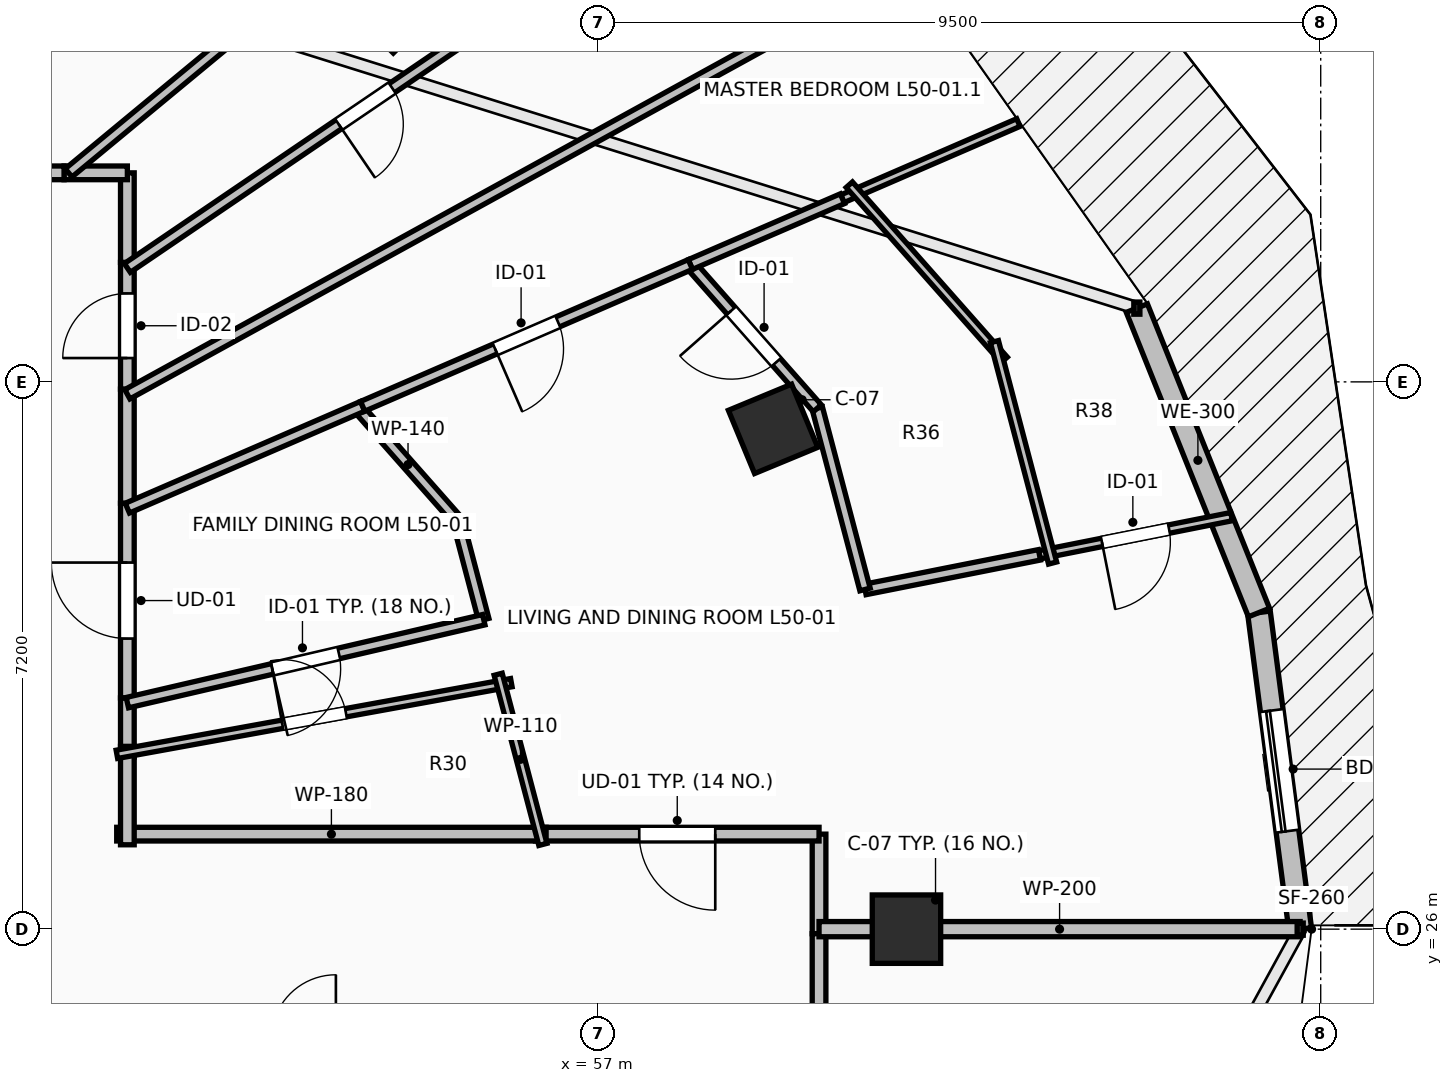
"""IFC4 building model, lengths in metres.
Left out: names, types, materials, properties, quantities, classifications, styles, units other than length and angle.
Written with IfcOpenShell. Run it as: python <this file> out.ifc"""

import sys

from ifc_helpers import new_model, si_unit, direction, frame, frame_2d, origin, origin_2d, place, context, subcontext, project, spatial, rectangle, extrude, element, fill, save


model = new_model("IFC4")
c1 = context("Model", 3, precision=1e-05, world=origin(), true_north=direction((0.0, 1.0)))
c2 = subcontext(c1, "Body", "Model", "MODEL_VIEW")
j1 = project(units=[si_unit("LENGTHUNIT", "METRE"), si_unit("PLANEANGLEUNIT", "RADIAN")], contexts=[c1])
p1 = place(None, origin())
s1 = spatial("IfcSite", under=j1, at=p1, CompositionType="ELEMENT")
p2 = place(p1, origin())
s2 = spatial("IfcBuilding", under=s1, at=p2, CompositionType="ELEMENT")
p3 = place(p2, frame((0.0, 0.0, 186.1)))
s3 = spatial("IfcBuildingStorey", under=s2, at=p3, CompositionType="ELEMENT", Elevation=186.1)
for number, where, z_axis, x_axis in (
    (1, (61.05, 26.0, 0.0), (0.0, 0.0, 1.0), (1.0, 0.0, 0.0)),
    (2, (59.295, 32.582, 0.0), (0.0, 0.0, 1.0), (0.924, 0.383, 0.0)),
    (3, (54.299, 38.162, 0.0), (0.0, 0.0, 1.0), (0.707, 0.707, 0.0)),
):
    element("IfcColumn", number, at=place(p3, frame(where, z_axis=z_axis, x_axis=x_axis)), inside=s3, PredefinedType="COLUMN", context=c2, shape_type="SweptSolid", body=[
        extrude(rectangle(XDim=0.9, YDim=0.9, at=origin_2d()), origin(), (0.0, 0.0, 1.0), 3.5),
    ])
p4 = place(p3, frame((66.23, 26.0, 0.0), z_axis=(0.0, 0.0, 1.0), x_axis=(-0.129147853268, 0.991625348605, 0.0)))
e4 = element("IfcWall", 4, at=p4, inside=s3, PredefinedType="STANDARD", context=c2, shape_type="SweptSolid", body=[
    extrude(rectangle(XDim=4.2, YDim=0.3, at=frame_2d((2.1, 0.0))), origin(), (0.0, 0.0, 1.0), 3.24),
])
p5 = place(p4, frame((1.3, 0.0, 0.0)))
e5 = element("IfcOpeningElement", 5, at=p5, cuts=e4, PredefinedType="OPENING", context=c2, shape_type="SweptSolid", body=[
    extrude(rectangle(XDim=1.6, YDim=2.3, at=frame_2d((0.8, 1.15))), frame((0.0, 0.165, 0.0), z_axis=(0.0, -1.0, 0.0), x_axis=(1.0, 0.0, 0.0)), (0.0, 0.0, 1.0), 0.33),
])
p6 = place(p3, frame((65.688, 30.165, 0.0), z_axis=(0.0, 0.0, 1.0), x_axis=(-0.372268409848, 0.928125116043, 0.0)))
e6 = element("IfcWall", 6, at=p6, inside=s3, PredefinedType="STANDARD", context=c2, shape_type="SweptSolid", body=[
    extrude(rectangle(XDim=4.315, YDim=0.3, at=frame_2d((2.158, 0.0))), origin(), (0.0, 0.0, 1.0), 3.24),
])
p7 = place(p3, frame((59.9, 25.94, 0.0), z_axis=(0.0, 0.0, 1.0), x_axis=(0.0, 1.0, 0.0)))
e7 = element("IfcWall", 7, at=p7, inside=s3, PredefinedType="PARTITIONING", context=c2, shape_type="SweptSolid", body=[
    extrude(rectangle(XDim=1.31, YDim=0.18, at=frame_2d((0.655, 0.0))), origin(), (0.0, 0.0, 1.0), 2.432),
])
p8 = place(p3, frame((59.9, 27.25, 0.0), z_axis=(0.0, 0.0, 1.0), x_axis=(-1.0, 0.0, 0.0)))
e8 = element("IfcWall", 8, at=p8, inside=s3, PredefinedType="PARTITIONING", context=c2, shape_type="SweptSolid", body=[
    extrude(rectangle(XDim=3.731, YDim=0.18, at=frame_2d((1.865, 0.0))), origin(), (0.0, 0.0, 1.0), 2.874),
])
p9 = place(p8, frame((1.365, 0.0, 0.0)))
e9 = element("IfcOpeningElement", 9, at=p9, cuts=e8, PredefinedType="OPENING", context=c2, shape_type="SweptSolid", body=[
    extrude(rectangle(XDim=1.0, YDim=2.15, at=frame_2d((0.5, 1.075))), frame((0.0, 0.105, 0.0), z_axis=(0.0, -1.0, 0.0), x_axis=(1.0, 0.0, 0.0)), (0.0, 0.0, 1.0), 0.21),
])
p10 = place(p3, frame((50.8, 28.265, 0.0), z_axis=(0.0, 0.0, 1.0), x_axis=(0.0, 1.0, 0.0)))
e10 = element("IfcWall", 10, at=p10, inside=s3, PredefinedType="PARTITIONING", context=c2, shape_type="SweptSolid", body=[
    extrude(rectangle(XDim=0.777, YDim=0.18, at=frame_2d((0.389, 0.0))), origin(), (0.0, 0.0, 1.0), 3.24),
])
p11 = place(p3, frame((50.8, 29.042, 0.0), z_axis=(0.0, 0.0, 1.0), x_axis=(0.0, 1.0, 0.0)))
e11 = element("IfcWall", 11, at=p11, inside=s3, PredefinedType="PARTITIONING", context=c2, shape_type="SweptSolid", body=[
    extrude(rectangle(XDim=2.562, YDim=0.18, at=frame_2d((1.281, 0.0))), origin(), (0.0, 0.0, 1.0), 3.24),
])
p12 = place(p11, frame((0.781, 0.0, 0.0)))
e12 = element("IfcOpeningElement", 12, at=p12, cuts=e11, PredefinedType="OPENING", context=c2, shape_type="SweptSolid", body=[
    extrude(rectangle(XDim=1.0, YDim=2.15, at=frame_2d((0.5, 1.075))), frame((0.0, 0.105, 0.0), z_axis=(0.0, -1.0, 0.0), x_axis=(1.0, 0.0, 0.0)), (0.0, 0.0, 1.0), 0.21),
])
p13 = place(p3, frame((56.309, 27.25, 0.0), z_axis=(0.0, 0.0, 1.0), x_axis=(-1.0, 0.0, 0.0)))
e13 = element("IfcWall", 13, at=p13, inside=s3, PredefinedType="PARTITIONING", context=c2, shape_type="SweptSolid", body=[
    extrude(rectangle(XDim=5.649, YDim=0.18, at=frame_2d((2.825, 0.0))), origin(), (0.0, 0.0, 1.0), 2.432),
])
p14 = place(p3, frame((50.8, 27.11, 0.0), z_axis=(0.0, 0.0, 1.0), x_axis=(0.0, 1.0, 0.0)))
e14 = element("IfcWall", 14, at=p14, inside=s3, PredefinedType="PARTITIONING", context=c2, shape_type="SweptSolid", body=[
    extrude(rectangle(XDim=1.295, YDim=0.18, at=frame_2d((0.647, 0.0))), origin(), (0.0, 0.0, 1.0), 2.432),
])
p15 = place(p3, frame((50.8, 31.604, 0.0), z_axis=(0.0, 0.0, 1.0), x_axis=(0.0, 1.0, 0.0)))
e15 = element("IfcWall", 15, at=p15, inside=s3, PredefinedType="PARTITIONING", context=c2, shape_type="SweptSolid", body=[
    extrude(rectangle(XDim=1.501, YDim=0.18, at=frame_2d((0.75, 0.0))), origin(), (0.0, 0.0, 1.0), 2.432),
])
p16 = place(p3, frame((50.8, 33.105, 0.0), z_axis=(0.0, 0.0, 1.0), x_axis=(0.0, 1.0, 0.0)))
e16 = element("IfcWall", 16, at=p16, inside=s3, PredefinedType="PARTITIONING", context=c2, shape_type="SweptSolid", body=[
    extrude(rectangle(XDim=1.667, YDim=0.18, at=frame_2d((0.833, 0.0))), origin(), (0.0, 0.0, 1.0), 2.432),
])
p17 = place(p16, frame((0.408, 0.0, 0.0)))
e17 = element("IfcOpeningElement", 17, at=p17, cuts=e16, PredefinedType="OPENING", context=c2, shape_type="SweptSolid", body=[
    extrude(rectangle(XDim=0.85, YDim=2.1, at=frame_2d((0.425, 1.05))), frame((0.0, 0.105, 0.0), z_axis=(0.0, -1.0, 0.0), x_axis=(1.0, 0.0, 0.0)), (0.0, 0.0, 1.0), 0.21),
])
p18 = place(p3, frame((50.8, 34.772, 0.0), z_axis=(0.0, 0.0, 1.0), x_axis=(0.0, 1.0, 0.0)))
e18 = element("IfcWall", 18, at=p18, inside=s3, PredefinedType="PARTITIONING", context=c2, shape_type="SweptSolid", body=[
    extrude(rectangle(XDim=1.178, YDim=0.18, at=frame_2d((0.589, 0.0))), origin(), (0.0, 0.0, 1.0), 2.432),
])
p19 = place(p3, frame((50.8, 35.95, 0.0), z_axis=(0.0, 0.0, 1.0), x_axis=(-1.0, 0.0, 0.0)))
e19 = element("IfcWall", 19, at=p19, inside=s3, PredefinedType="PARTITIONING", context=c2, shape_type="SweptSolid", body=[
    extrude(rectangle(XDim=0.833, YDim=0.18, at=frame_2d((0.417, 0.0))), origin(), (0.0, 0.0, 1.0), 3.24),
])
p20 = place(p3, frame((49.967, 35.95, 0.0), z_axis=(0.0, 0.0, 1.0), x_axis=(-1.0, 0.0, 0.0)))
e20 = element("IfcWall", 20, at=p20, inside=s3, PredefinedType="PARTITIONING", context=c2, shape_type="SweptSolid", body=[
    extrude(rectangle(XDim=2.077, YDim=0.18, at=frame_2d((1.039, 0.0))), origin(), (0.0, 0.0, 1.0), 2.432),
])
p21 = place(p20, frame((0.333, 0.0, 0.0)))
e21 = element("IfcOpeningElement", 21, at=p21, cuts=e20, PredefinedType="OPENING", context=c2, shape_type="SweptSolid", body=[
    extrude(rectangle(XDim=0.85, YDim=2.1, at=frame_2d((0.425, 1.05))), frame((0.0, 0.105, 0.0), z_axis=(0.0, -1.0, 0.0), x_axis=(1.0, 0.0, 0.0)), (0.0, 0.0, 1.0), 0.21),
])
p22 = place(p3, frame((59.9, 24.55, 0.0), z_axis=(0.0, 0.0, 1.0), x_axis=(0.0, 1.0, 0.0)))
e22 = element("IfcWall", 22, at=p22, inside=s3, PredefinedType="PARTITIONING", context=c2, shape_type="SweptSolid", body=[
    extrude(rectangle(XDim=1.39, YDim=0.18, at=frame_2d((0.695, 0.0))), origin(), (0.0, 0.0, 1.0), 2.432),
])
p23 = place(p3, frame((53.838, 32.853, 0.0), z_axis=(0.0, 0.0, 1.0), x_axis=(0.662046229388, -0.749463001191, 0.0)))
e23 = element("IfcWall", 23, at=p23, inside=s3, PredefinedType="PARTITIONING", context=c2, shape_type="SweptSolid", body=[
    extrude(rectangle(XDim=1.977, YDim=0.14, at=frame_2d((0.989, 0.0))), origin(), (0.0, 0.0, 1.0), 2.432),
])
p24 = place(p3, frame((55.147, 31.371, 0.0), z_axis=(0.0, 0.0, 1.0), x_axis=(0.25443966192, -0.967088650767, 0.0)))
e24 = element("IfcWall", 24, at=p24, inside=s3, PredefinedType="PARTITIONING", context=c2, shape_type="SweptSolid", body=[
    extrude(rectangle(XDim=1.344, YDim=0.14, at=frame_2d((0.672, 0.0))), origin(), (0.0, 0.0, 1.0), 3.24),
])
p25 = place(p3, frame((55.489, 30.071, 0.0), z_axis=(0.0, 0.0, 1.0), x_axis=(-0.973980178663, -0.226633209333, 0.0)))
e25 = element("IfcWall", 25, at=p25, inside=s3, PredefinedType="PARTITIONING", context=c2, shape_type="SweptSolid", body=[
    extrude(rectangle(XDim=4.814, YDim=0.14, at=frame_2d((2.407, 0.0))), origin(), (0.0, 0.0, 1.0), 2.922),
])
p26 = place(p25, frame((1.957, 0.0, 0.0)))
e26 = element("IfcOpeningElement", 26, at=p26, cuts=e25, PredefinedType="OPENING", context=c2, shape_type="SweptSolid", body=[
    extrude(rectangle(XDim=0.9, YDim=2.1, at=frame_2d((0.45, 1.05))), frame((0.0, 0.085, 0.0), z_axis=(0.0, -1.0, 0.0), x_axis=(1.0, 0.0, 0.0)), (0.0, 0.0, 1.0), 0.17),
])
p27 = place(p3, frame((53.896, 32.879, 0.0), z_axis=(0.0, 0.0, 1.0), x_axis=(-0.917742985146, -0.39717478925, 0.0)))
e27 = element("IfcWall", 27, at=p27, inside=s3, PredefinedType="PARTITIONING", context=c2, shape_type="SweptSolid", body=[
    extrude(rectangle(XDim=3.374, YDim=0.14, at=frame_2d((1.687, 0.0))), origin(), (0.0, 0.0, 1.0), 2.432),
])
p28 = place(p3, frame((50.662, 28.3, 0.0), z_axis=(0.0, 0.0, 1.0), x_axis=(0.983892120625, 0.178763237197, 0.0)))
e28 = element("IfcWall", 28, at=p28, inside=s3, PredefinedType="PARTITIONING", context=c2, shape_type="SweptSolid", body=[
    extrude(rectangle(XDim=5.274, YDim=0.11, at=frame_2d((2.637, 0.0))), origin(), (0.0, 0.0, 1.0), 2.874),
])
p29 = place(p28, frame((2.212, 0.0, 0.0)))
e29 = element("IfcOpeningElement", 29, at=p29, cuts=e28, PredefinedType="OPENING", context=c2, shape_type="SweptSolid", body=[
    extrude(rectangle(XDim=0.85, YDim=2.1, at=frame_2d((0.425, 1.05))), frame((0.0, 0.07, 0.0), z_axis=(0.0, -1.0, 0.0), x_axis=(1.0, 0.0, 0.0)), (0.0, 0.0, 1.0), 0.14),
])
p30 = place(p3, frame((55.678, 29.354, 0.0), z_axis=(0.0, 0.0, 1.0), x_axis=(0.254057219361, -0.96718919002, 0.0)))
e30 = element("IfcWall", 30, at=p30, inside=s3, PredefinedType="PARTITIONING", context=c2, shape_type="SweptSolid", body=[
    extrude(rectangle(XDim=2.315, YDim=0.11, at=frame_2d((1.157, 0.0))), origin(), (0.0, 0.0, 1.0), 2.432),
])
p31 = place(p3, frame((65.327, 31.427, 0.0), z_axis=(0.0, 0.0, 1.0), x_axis=(-0.980809558385, -0.194968228644, 0.0)))
e31 = element("IfcWall", 31, at=p31, inside=s3, PredefinedType="PARTITIONING", context=c2, shape_type="SweptSolid", body=[
    extrude(rectangle(XDim=2.577, YDim=0.11, at=frame_2d((1.289, 0.0))), origin(), (0.0, 0.0, 1.0), 3.24),
])
p32 = place(p31, frame((0.838, 0.0, 0.0)))
e32 = element("IfcOpeningElement", 32, at=p32, cuts=e31, PredefinedType="OPENING", context=c2, shape_type="SweptSolid", body=[
    extrude(rectangle(XDim=0.9, YDim=2.1, at=frame_2d((0.45, 1.05))), frame((0.0, 0.07, 0.0), z_axis=(0.0, -1.0, 0.0), x_axis=(1.0, 0.0, 0.0)), (0.0, 0.0, 1.0), 0.14),
])
p33 = place(p3, frame((60.208, 35.609, 0.0), z_axis=(0.0, 0.0, 1.0), x_axis=(0.917692098887, 0.397292350341, 0.0)))
e33 = element("IfcWall", 33, at=p33, inside=s3, PredefinedType="PARTITIONING", context=c2, shape_type="SweptSolid", body=[
    extrude(rectangle(XDim=2.522, YDim=0.11, at=frame_2d((1.261, 0.0))), origin(), (0.0, 0.0, 1.0), 3.24),
])
p34 = place(p3, frame((62.8, 30.925, 0.0), z_axis=(0.0, 0.0, 1.0), x_axis=(-0.980840670114, -0.194811652245, 0.0)))
e34 = element("IfcWall", 34, at=p34, inside=s3, PredefinedType="PARTITIONING", context=c2, shape_type="SweptSolid", body=[
    extrude(rectangle(XDim=2.34, YDim=0.14, at=frame_2d((1.17, 0.0))), origin(), (0.0, 0.0, 1.0), 3.24),
])
p35 = place(p3, frame((60.505, 30.469, 0.0), z_axis=(0.0, 0.0, 1.0), x_axis=(-0.254702896388, 0.967019355841, 0.0)))
e35 = element("IfcWall", 35, at=p35, inside=s3, PredefinedType="PARTITIONING", context=c2, shape_type="SweptSolid", body=[
    extrude(rectangle(XDim=2.465, YDim=0.14, at=frame_2d((1.233, 0.0))), origin(), (0.0, 0.0, 1.0), 3.24),
])
p36 = place(p3, frame((59.877, 32.853, 0.0), z_axis=(0.0, 0.0, 1.0), x_axis=(-0.661957655691, 0.749541234404, 0.0)))
e36 = element("IfcWall", 36, at=p36, inside=s3, PredefinedType="PARTITIONING", context=c2, shape_type="SweptSolid", body=[
    extrude(rectangle(XDim=2.523, YDim=0.14, at=frame_2d((1.261, 0.0))), origin(), (0.0, 0.0, 1.0), 3.24),
])
p37 = place(p36, frame((0.811, 0.0, 0.0)))
e37 = element("IfcOpeningElement", 37, at=p37, cuts=e36, PredefinedType="OPENING", context=c2, shape_type="SweptSolid", body=[
    extrude(rectangle(XDim=0.9, YDim=2.1, at=frame_2d((0.45, 1.05))), frame((0.0, 0.085, 0.0), z_axis=(0.0, -1.0, 0.0), x_axis=(1.0, 0.0, 0.0)), (0.0, 0.0, 1.0), 0.17),
])
p38 = place(p3, frame((58.207, 34.744, 0.0), z_axis=(0.0, 0.0, 1.0), x_axis=(0.917748928086, 0.397161056748, 0.0)))
e38 = element("IfcWall", 38, at=p38, inside=s3, PredefinedType="PARTITIONING", context=c2, shape_type="SweptSolid", body=[
    extrude(rectangle(XDim=2.18, YDim=0.14, at=frame_2d((1.09, 0.0))), origin(), (0.0, 0.0, 1.0), 3.24),
])
p39 = place(p3, frame((58.207, 34.744, 0.0), z_axis=(0.0, 0.0, 1.0), x_axis=(-0.917771035239, -0.397109968241, 0.0)))
e39 = element("IfcWall", 39, at=p39, inside=s3, PredefinedType="PARTITIONING", context=c2, shape_type="SweptSolid", body=[
    extrude(rectangle(XDim=4.697, YDim=0.14, at=frame_2d((2.349, 0.0))), origin(), (0.0, 0.0, 1.0), 2.432),
])
p40 = place(p39, frame((1.898, 0.0, 0.0)))
e40 = element("IfcOpeningElement", 40, at=p40, cuts=e39, PredefinedType="OPENING", context=c2, shape_type="SweptSolid", body=[
    extrude(rectangle(XDim=0.9, YDim=2.1, at=frame_2d((0.45, 1.05))), frame((0.0, 0.085, 0.0), z_axis=(0.0, -1.0, 0.0), x_axis=(1.0, 0.0, 0.0)), (0.0, 0.0, 1.0), 0.17),
])
p41 = place(p3, frame((59.9, 26.0, 0.0), z_axis=(0.0, 0.0, 1.0), x_axis=(1.0, 0.0, 0.0)))
e41 = element("IfcWall", 41, at=p41, inside=s3, PredefinedType="PARTITIONING", context=c2, shape_type="SweptSolid", body=[
    extrude(rectangle(XDim=6.329, YDim=0.2, at=frame_2d((3.165, 0.0))), origin(), (0.0, 0.0, 1.0), 2.432),
])
p42 = place(p3, frame((60.298, 35.794, 0.0), z_axis=(0.0, 0.0, 1.0), x_axis=(0.662277588726, -0.74925856383, 0.0)))
e42 = element("IfcWall", 42, at=p42, inside=s3, PredefinedType="PARTITIONING", context=c2, shape_type="SweptSolid", body=[
    extrude(rectangle(XDim=3.076, YDim=0.11, at=frame_2d((1.538, 0.0))), origin(), (0.0, 0.0, 1.0), 3.24),
])
p43 = place(p3, frame((62.208, 33.729, 0.0), z_axis=(0.0, 0.0, 1.0), x_axis=(0.254058335644, -0.967188896798, 0.0)))
e43 = element("IfcWall", 43, at=p43, inside=s3, PredefinedType="PARTITIONING", context=c2, shape_type="SweptSolid", body=[
    extrude(rectangle(XDim=3.012, YDim=0.11, at=frame_2d((1.506, 0.0))), origin(), (0.0, 0.0, 1.0), 3.24),
])
p44 = place(p3, frame((60.761, 38.513, 0.0), z_axis=(0.0, 0.0, 1.0), x_axis=(-0.876315654865, -0.481737348602, 0.0)))
e44 = element("IfcWall", 44, at=p44, inside=s3, PredefinedType="PARTITIONING", context=c2, shape_type="SweptSolid", body=[
    extrude(rectangle(XDim=11.367, YDim=0.14, at=frame_2d((5.684, 0.0))), origin(), (0.0, 0.0, 1.0), 2.432),
])
p45 = place(p3, frame((58.917, 40.215, 0.0), z_axis=(0.0, 0.0, 1.0), x_axis=(-0.827087951184, -0.562072522906, 0.0)))
e45 = element("IfcWall", 45, at=p45, inside=s3, PredefinedType="PARTITIONING", context=c2, shape_type="SweptSolid", body=[
    extrude(rectangle(XDim=9.814, YDim=0.14, at=frame_2d((4.907, 0.0))), origin(), (0.0, 0.0, 1.0), 2.432),
])
p46 = place(p45, frame((5.602, 0.0, 0.0)))
e46 = element("IfcOpeningElement", 46, at=p46, cuts=e45, PredefinedType="OPENING", context=c2, shape_type="SweptSolid", body=[
    extrude(rectangle(XDim=0.85, YDim=2.1, at=frame_2d((0.425, 1.05))), frame((0.0, 0.085, 0.0), z_axis=(0.0, -1.0, 0.0), x_axis=(1.0, 0.0, 0.0)), (0.0, 0.0, 1.0), 0.17),
])
p47 = place(p3, frame((56.98, 41.702, 0.0), z_axis=(0.0, 0.0, 1.0), x_axis=(-0.770511618294, -0.637425953405, 0.0)))
e47 = element("IfcWall", 47, at=p47, inside=s3, PredefinedType="PARTITIONING", context=c2, shape_type="SweptSolid", body=[
    extrude(rectangle(XDim=9.024, YDim=0.14, at=frame_2d((4.512, 0.0))), origin(), (0.0, 0.0, 1.0), 2.774),
])
p48 = place(p3, frame((54.959, 42.959, 0.0), z_axis=(0.0, 0.0, 1.0), x_axis=(-0.707106781187, -0.707106781187, 0.0)))
e48 = element("IfcWall", 48, at=p48, inside=s3, PredefinedType="PARTITIONING", context=c2, shape_type="SweptSolid", body=[
    extrude(rectangle(XDim=8.492, YDim=0.2, at=frame_2d((4.246, 0.0))), origin(), (0.0, 0.0, 1.0), 2.774),
])
p49 = place(p5, origin())
e49 = element("IfcDoor", 49, at=p49, inside=s3, OperationType="SLIDING_TO_LEFT", PredefinedType="DOOR", context=c2, shape_type="SweptSolid", body=[
    extrude(rectangle(XDim=1.6, YDim=2.3, at=frame_2d((0.8, 1.15))), frame((0.0, 0.025, 0.0), z_axis=(0.0, -1.0, 0.0), x_axis=(1.0, 0.0, 0.0)), (0.0, 0.0, 1.0), 0.05),
])
fill(e5, e49)
p50 = place(p9, origin())
e50 = element("IfcDoor", 50, at=p50, inside=s3, OperationType="SINGLE_SWING_LEFT", PredefinedType="DOOR", context=c2, shape_type="SweptSolid", body=[
    extrude(rectangle(XDim=1.0, YDim=2.15, at=frame_2d((0.5, 1.075))), frame((0.0, 0.025, 0.0), z_axis=(0.0, -1.0, 0.0), x_axis=(1.0, 0.0, 0.0)), (0.0, 0.0, 1.0), 0.05),
])
fill(e9, e50)
p51 = place(p12, origin())
e51 = element("IfcDoor", 51, at=p51, inside=s3, OperationType="SINGLE_SWING_RIGHT", PredefinedType="DOOR", context=c2, shape_type="SweptSolid", body=[
    extrude(rectangle(XDim=1.0, YDim=2.15, at=frame_2d((0.5, 1.075))), frame((0.0, 0.025, 0.0), z_axis=(0.0, -1.0, 0.0), x_axis=(1.0, 0.0, 0.0)), (0.0, 0.0, 1.0), 0.05),
])
fill(e12, e51)
p52 = place(p26, origin())
e52 = element("IfcDoor", 52, at=p52, inside=s3, OperationType="SINGLE_SWING_RIGHT", PredefinedType="DOOR", context=c2, shape_type="SweptSolid", body=[
    extrude(rectangle(XDim=0.9, YDim=2.1, at=frame_2d((0.45, 1.05))), frame((0.0, 0.025, 0.0), z_axis=(0.0, -1.0, 0.0), x_axis=(1.0, 0.0, 0.0)), (0.0, 0.0, 1.0), 0.05),
])
fill(e26, e52)
p53 = place(p29, origin())
e53 = element("IfcDoor", 53, at=p53, inside=s3, OperationType="SINGLE_SWING_LEFT", PredefinedType="DOOR", context=c2, shape_type="SweptSolid", body=[
    extrude(rectangle(XDim=0.85, YDim=2.1, at=frame_2d((0.425, 1.05))), frame((0.0, 0.025, 0.0), z_axis=(0.0, -1.0, 0.0), x_axis=(1.0, 0.0, 0.0)), (0.0, 0.0, 1.0), 0.05),
])
fill(e29, e53)
p54 = place(p32, origin())
e54 = element("IfcDoor", 54, at=p54, inside=s3, OperationType="SINGLE_SWING_RIGHT", PredefinedType="DOOR", context=c2, shape_type="SweptSolid", body=[
    extrude(rectangle(XDim=0.9, YDim=2.1, at=frame_2d((0.45, 1.05))), frame((0.0, 0.025, 0.0), z_axis=(0.0, -1.0, 0.0), x_axis=(1.0, 0.0, 0.0)), (0.0, 0.0, 1.0), 0.05),
])
fill(e32, e54)
p55 = place(p37, origin())
e55 = element("IfcDoor", 55, at=p55, inside=s3, OperationType="SINGLE_SWING_RIGHT", PredefinedType="DOOR", context=c2, shape_type="SweptSolid", body=[
    extrude(rectangle(XDim=0.9, YDim=2.1, at=frame_2d((0.45, 1.05))), frame((0.0, 0.025, 0.0), z_axis=(0.0, -1.0, 0.0), x_axis=(1.0, 0.0, 0.0)), (0.0, 0.0, 1.0), 0.05),
])
fill(e37, e55)
p56 = place(p40, origin())
e56 = element("IfcDoor", 56, at=p56, inside=s3, OperationType="SINGLE_SWING_RIGHT", PredefinedType="DOOR", context=c2, shape_type="SweptSolid", body=[
    extrude(rectangle(XDim=0.9, YDim=2.1, at=frame_2d((0.45, 1.05))), frame((0.0, 0.025, 0.0), z_axis=(0.0, -1.0, 0.0), x_axis=(1.0, 0.0, 0.0)), (0.0, 0.0, 1.0), 0.05),
])
fill(e40, e56)
p57 = place(p17, origin())
e57 = element("IfcDoor", 57, at=p57, inside=s3, OperationType="SINGLE_SWING_LEFT", PredefinedType="DOOR", context=c2, shape_type="SweptSolid", body=[
    extrude(rectangle(XDim=0.85, YDim=2.1, at=frame_2d((0.425, 1.05))), frame((0.0, 0.025, 0.0), z_axis=(0.0, -1.0, 0.0), x_axis=(1.0, 0.0, 0.0)), (0.0, 0.0, 1.0), 0.05),
])
fill(e17, e57)
p58 = place(p46, origin())
e58 = element("IfcDoor", 58, at=p58, inside=s3, OperationType="SINGLE_SWING_RIGHT", PredefinedType="DOOR", context=c2, shape_type="SweptSolid", body=[
    extrude(rectangle(XDim=0.85, YDim=2.1, at=frame_2d((0.425, 1.05))), frame((0.0, 0.025, 0.0), z_axis=(0.0, -1.0, 0.0), x_axis=(1.0, 0.0, 0.0)), (0.0, 0.0, 1.0), 0.05),
])
fill(e46, e58)
save(model, sys.argv[1])
